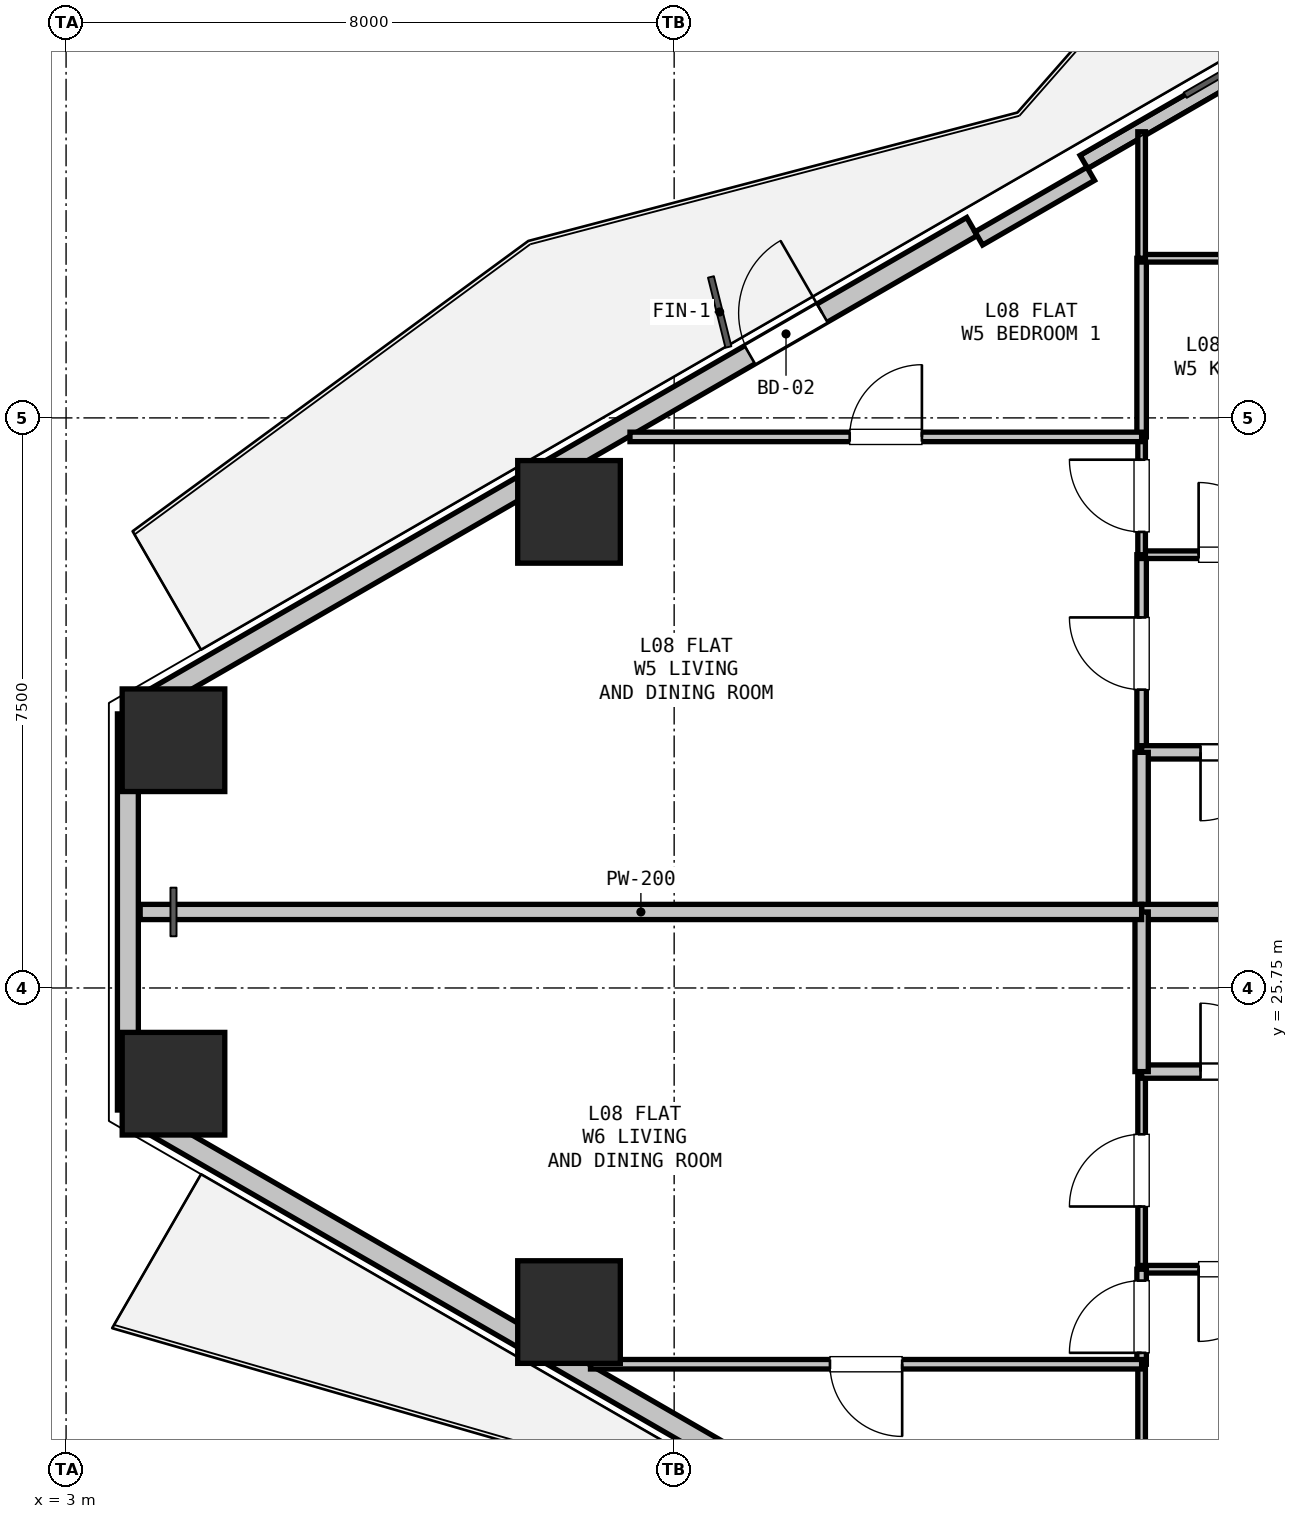
"""IFC4 building model, lengths in metres.
Left out: names, types, materials, properties, quantities, classifications, styles, units other than length and angle.
Written with IfcOpenShell. Run it as: python <this file> out.ifc"""

import sys

from ifc_helpers import new_model, si_unit, direction, frame, frame_2d, origin, origin_2d, place, context, subcontext, project, spatial, rectangle, hollow_rectangle, extrude, element, fill, save


model = new_model("IFC4")
c1 = context("Model", 3, precision=1e-05, world=origin(), true_north=direction((0.0, 1.0)))
c2 = subcontext(c1, "Body", "Model", "MODEL_VIEW")
j1 = project(units=[si_unit("LENGTHUNIT", "METRE"), si_unit("PLANEANGLEUNIT", "RADIAN")], contexts=[c1])
p1 = place(None, origin())
s1 = spatial("IfcSite", under=j1, at=p1, CompositionType="ELEMENT")
p2 = place(p1, origin())
s2 = spatial("IfcBuilding", under=s1, at=p2, CompositionType="ELEMENT")
p3 = place(p2, frame((0.0, 0.0, 32.4)))
s3 = spatial("IfcBuildingStorey", under=s2, at=p3, CompositionType="ELEMENT", Elevation=32.4)
for number, where, z_axis, x_axis in (
    (1, (4.413, 29.009, 0.0), (0.0, 0.0, 1.0), (1.0, 0.0, 0.0)),
    (2, (9.617, 32.014, 0.0), (0.0, 0.0, 1.0), (1.0, 0.0, 0.0)),
    (3, (9.617, 21.486, 0.0), (0.0, 0.0, 1.0), (1.0, 0.0, 0.0)),
    (4, (4.413, 24.491, 0.0), (0.0, 0.0, 1.0), (1.0, 0.0, 0.0)),
):
    element("IfcColumn", number, at=place(p3, frame(where, z_axis=z_axis, x_axis=x_axis)), inside=s3, PredefinedType="COLUMN", context=c2, shape_type="SweptSolid", body=[
        extrude(hollow_rectangle(XDim=1.35, YDim=1.35, WallThickness=0.036, at=origin_2d()), origin(), (0.0, 0.0, 1.0), 3.3),
    ])
p4 = place(p3, frame((3.813, 24.144, 0.0), z_axis=(0.0, 0.0, 1.0), x_axis=(0.0, 1.0, 0.0)))
e5 = element("IfcWall", 5, at=p4, inside=s3, PredefinedType="SOLIDWALL", context=c2, shape_type="SweptSolid", body=[
    extrude(rectangle(XDim=5.211, YDim=0.275, at=frame_2d((2.606, 0.0))), origin(), (0.0, 0.0, 1.0), 2.66),
])
p5 = place(p3, frame((3.943, 29.431, 0.0), z_axis=(0.0, 0.0, 1.0), x_axis=(0.866027105532, 0.499997052475, 0.0)))
e6 = element("IfcWall", 6, at=p5, inside=s3, PredefinedType="SOLIDWALL", context=c2, shape_type="SweptSolid", body=[
    extrude(rectangle(XDim=12.673, YDim=0.275, at=frame_2d((6.336, 0.0))), origin(), (0.0, 0.0, 1.0), 2.66),
])
p6 = place(p5, frame((9.298, 0.0, 0.0)))
e7 = element("IfcOpeningElement", 7, at=p6, cuts=e6, PredefinedType="OPENING", context=c2, shape_type="SweptSolid", body=[
    extrude(rectangle(XDim=1.1, YDim=2.1, at=frame_2d((0.55, 1.05))), frame((0.0, 0.147, 0.0), z_axis=(0.0, -1.0, 0.0), x_axis=(1.0, 0.0, 0.0)), (0.0, 0.0, 1.0), 0.295),
])
p7 = place(p3, frame((16.39, 36.617, 0.0), z_axis=(0.0, 0.0, 1.0), x_axis=(0.866027351828, 0.499996625875, 0.0)))
e8 = element("IfcWall", 8, at=p7, inside=s3, PredefinedType="PARAPET", context=c2, shape_type="SweptSolid", body=[
    extrude(rectangle(XDim=11.973, YDim=0.2, at=frame_2d((5.987, 0.0))), origin(), (0.0, 0.0, 1.0), 0.2),
])
p8 = place(p3, frame((15.008, 35.611, 0.0), z_axis=(0.0, 0.0, 1.0), x_axis=(0.86605165483, 0.499954529098, 0.0)))
e9 = element("IfcWall", 9, at=p8, inside=s3, PredefinedType="PARAPET", context=c2, shape_type="SweptSolid", body=[
    extrude(rectangle(XDim=1.7, YDim=0.2, at=frame_2d((0.85, 0.0))), origin(), (0.0, 0.0, 1.0), 2.66),
])
p9 = place(p3, frame((14.918, 17.733, 0.0), z_axis=(0.0, 0.0, 1.0), x_axis=(-0.866027105532, 0.499997052475, 0.0)))
e10 = element("IfcWall", 10, at=p9, inside=s3, PredefinedType="SOLIDWALL", context=c2, shape_type="SweptSolid", body=[
    extrude(rectangle(XDim=12.673, YDim=0.275, at=frame_2d((6.336, 0.0))), origin(), (0.0, 0.0, 1.0), 2.66),
])
p10 = place(p9, frame((2.216, 0.0, 0.9)))
e11 = element("IfcOpeningElement", 11, at=p10, cuts=e10, PredefinedType="OPENING", context=c2, shape_type="SweptSolid", body=[
    extrude(rectangle(XDim=1.2, YDim=1.4, at=frame_2d((0.6, 0.7))), frame((0.0, 0.147, 0.0), z_axis=(0.0, -1.0, 0.0), x_axis=(1.0, 0.0, 0.0)), (0.0, 0.0, 1.0), 0.295),
])
p11 = place(p3, frame((17.15, 28.85, 0.0), z_axis=(0.0, 0.0, 1.0), x_axis=(0.0, 1.0, 0.0)))
e12 = element("IfcWall", 12, at=p11, inside=s3, PredefinedType="PARTITIONING", context=c2, shape_type="SweptSolid", body=[
    extrude(rectangle(XDim=2.6, YDim=0.125, at=frame_2d((1.3, 0.0))), origin(), (0.0, 0.0, 1.0), 3.04),
])
p12 = place(p11, frame((0.825, 0.0, 0.0)))
e13 = element("IfcOpeningElement", 13, at=p12, cuts=e12, PredefinedType="OPENING", context=c2, shape_type="SweptSolid", body=[
    extrude(rectangle(XDim=0.95, YDim=2.1, at=frame_2d((0.475, 1.05))), frame((0.0, 0.073, 0.0), z_axis=(0.0, -1.0, 0.0), x_axis=(1.0, 0.0, 0.0)), (0.0, 0.0, 1.0), 0.145),
])
p13 = place(p3, frame((17.15, 31.45, 0.0), z_axis=(0.0, 0.0, 1.0), x_axis=(1.0, 0.0, 0.0)))
e14 = element("IfcWall", 14, at=p13, inside=s3, PredefinedType="PARTITIONING", context=c2, shape_type="SweptSolid", body=[
    extrude(rectangle(XDim=2.45, YDim=0.1, at=frame_2d((1.225, 0.0))), origin(), (0.0, 0.0, 1.0), 3.04),
])
p14 = place(p13, frame((0.75, 0.0, 0.0)))
e15 = element("IfcOpeningElement", 15, at=p14, cuts=e14, PredefinedType="OPENING", context=c2, shape_type="SweptSolid", body=[
    extrude(rectangle(XDim=0.95, YDim=2.1, at=frame_2d((0.475, 1.05))), frame((0.0, 0.06, 0.0), z_axis=(0.0, -1.0, 0.0), x_axis=(1.0, 0.0, 0.0)), (0.0, 0.0, 1.0), 0.12),
])
p15 = place(p3, frame((19.6, 28.85, 0.0), z_axis=(0.0, 0.0, 1.0), x_axis=(-1.0, 0.0, 0.0)))
e16 = element("IfcWall", 16, at=p15, inside=s3, PredefinedType="PLUMBINGWALL", context=c2, shape_type="SweptSolid", body=[
    extrude(rectangle(XDim=2.45, YDim=0.175, at=frame_2d((1.225, 0.0))), origin(), (0.0, 0.0, 1.0), 3.04),
])
p16 = place(p15, frame((0.775, 0.0, 0.0)))
e17 = element("IfcOpeningElement", 17, at=p16, cuts=e16, PredefinedType="OPENING", context=c2, shape_type="SweptSolid", body=[
    extrude(rectangle(XDim=0.9, YDim=2.1, at=frame_2d((0.45, 1.05))), frame((0.0, 0.097, 0.0), z_axis=(0.0, -1.0, 0.0), x_axis=(1.0, 0.0, 0.0)), (0.0, 0.0, 1.0), 0.195),
])
p17 = place(p3, frame((17.15, 22.05, 0.0), z_axis=(0.0, 0.0, 1.0), x_axis=(0.0, 1.0, 0.0)))
e18 = element("IfcWall", 18, at=p17, inside=s3, PredefinedType="PARTITIONING", context=c2, shape_type="SweptSolid", body=[
    extrude(rectangle(XDim=2.6, YDim=0.1, at=frame_2d((1.3, 0.0))), origin(), (0.0, 0.0, 1.0), 3.04),
])
p18 = place(p17, frame((0.825, 0.0, 0.0)))
e19 = element("IfcOpeningElement", 19, at=p18, cuts=e18, PredefinedType="OPENING", context=c2, shape_type="SweptSolid", body=[
    extrude(rectangle(XDim=0.95, YDim=2.1, at=frame_2d((0.475, 1.05))), frame((0.0, 0.06, 0.0), z_axis=(0.0, -1.0, 0.0), x_axis=(1.0, 0.0, 0.0)), (0.0, 0.0, 1.0), 0.12),
])
p19 = place(p3, frame((17.15, 24.65, 0.0), z_axis=(0.0, 0.0, 1.0), x_axis=(1.0, 0.0, 0.0)))
e20 = element("IfcWall", 20, at=p19, inside=s3, PredefinedType="PLUMBINGWALL", context=c2, shape_type="SweptSolid", body=[
    extrude(rectangle(XDim=2.45, YDim=0.175, at=frame_2d((1.225, 0.0))), origin(), (0.0, 0.0, 1.0), 3.04),
])
p20 = place(p19, frame((0.775, 0.0, 0.0)))
e21 = element("IfcOpeningElement", 21, at=p20, cuts=e20, PredefinedType="OPENING", context=c2, shape_type="SweptSolid", body=[
    extrude(rectangle(XDim=0.9, YDim=2.1, at=frame_2d((0.45, 1.05))), frame((0.0, 0.097, 0.0), z_axis=(0.0, -1.0, 0.0), x_axis=(1.0, 0.0, 0.0)), (0.0, 0.0, 1.0), 0.195),
])
p21 = place(p3, frame((19.6, 22.05, 0.0), z_axis=(0.0, 0.0, 1.0), x_axis=(-1.0, 0.0, 0.0)))
e22 = element("IfcWall", 22, at=p21, inside=s3, PredefinedType="PARTITIONING", context=c2, shape_type="SweptSolid", body=[
    extrude(rectangle(XDim=2.45, YDim=0.1, at=frame_2d((1.225, 0.0))), origin(), (0.0, 0.0, 1.0), 3.04),
])
p22 = place(p21, frame((0.75, 0.0, 0.0)))
e23 = element("IfcOpeningElement", 23, at=p22, cuts=e22, PredefinedType="OPENING", context=c2, shape_type="SweptSolid", body=[
    extrude(rectangle(XDim=0.95, YDim=2.1, at=frame_2d((0.475, 1.05))), frame((0.0, 0.06, 0.0), z_axis=(0.0, -1.0, 0.0), x_axis=(1.0, 0.0, 0.0)), (0.0, 0.0, 1.0), 0.12),
])
p23 = place(p3, frame((17.15, 26.75, 0.0), z_axis=(0.0, 0.0, 1.0), x_axis=(0.0, 1.0, 0.0)))
e24 = element("IfcWall", 24, at=p23, inside=s3, PredefinedType="PLUMBINGWALL", context=c2, shape_type="SweptSolid", body=[
    extrude(rectangle(XDim=2.1, YDim=0.175, at=frame_2d((1.05, 0.0))), origin(), (0.0, 0.0, 1.0), 3.04),
])
p24 = place(p3, frame((19.6, 26.75, 0.0), z_axis=(0.0, 0.0, 1.0), x_axis=(-1.0, 0.0, 0.0)))
e25 = element("IfcWall", 25, at=p24, inside=s3, PredefinedType="PARTITIONING", context=c2, shape_type="SweptSolid", body=[
    extrude(rectangle(XDim=2.45, YDim=0.2, at=frame_2d((1.225, 0.0))), origin(), (0.0, 0.0, 1.0), 3.04),
])
p25 = place(p3, frame((17.15, 31.45, 0.0), z_axis=(0.0, 0.0, 1.0), x_axis=(0.0, 1.0, 0.0)))
e26 = element("IfcWall", 26, at=p25, inside=s3, PredefinedType="PARTITIONING", context=c2, shape_type="SweptSolid", body=[
    extrude(rectangle(XDim=1.55, YDim=0.1, at=frame_2d((0.775, 0.0))), origin(), (0.0, 0.0, 1.0), 2.338),
])
p26 = place(p25, frame((0.3, 0.0, 0.0)))
e27 = element("IfcOpeningElement", 27, at=p26, cuts=e26, PredefinedType="OPENING", context=c2, shape_type="SweptSolid", body=[
    extrude(rectangle(XDim=0.95, YDim=2.1, at=frame_2d((0.475, 1.05))), frame((0.0, 0.06, 0.0), z_axis=(0.0, -1.0, 0.0), x_axis=(1.0, 0.0, 0.0)), (0.0, 0.0, 1.0), 0.12),
])
p27 = place(p3, frame((17.15, 33.0, 0.0), z_axis=(0.0, 0.0, 1.0), x_axis=(0.0, 1.0, 0.0)))
e28 = element("IfcWall", 28, at=p27, inside=s3, PredefinedType="PARTITIONING", context=c2, shape_type="SweptSolid", body=[
    extrude(rectangle(XDim=2.35, YDim=0.125, at=frame_2d((1.175, 0.0))), origin(), (0.0, 0.0, 1.0), 3.04),
])
p28 = place(p3, frame((17.15, 35.35, 0.0), z_axis=(0.0, 0.0, 1.0), x_axis=(1.0, 0.0, 0.0)))
e29 = element("IfcWall", 29, at=p28, inside=s3, PredefinedType="PARTITIONING", context=c2, shape_type="SweptSolid", body=[
    extrude(rectangle(XDim=2.45, YDim=0.1, at=frame_2d((1.225, 0.0))), origin(), (0.0, 0.0, 1.0), 3.04),
])
p29 = place(p3, frame((17.15, 24.65, 0.0), z_axis=(0.0, 0.0, 1.0), x_axis=(0.0, 1.0, 0.0)))
e30 = element("IfcWall", 30, at=p29, inside=s3, PredefinedType="PLUMBINGWALL", context=c2, shape_type="SweptSolid", body=[
    extrude(rectangle(XDim=2.1, YDim=0.175, at=frame_2d((1.05, 0.0))), origin(), (0.0, 0.0, 1.0), 3.04),
])
p30 = place(p3, frame((17.15, 18.15, 0.0), z_axis=(0.0, 0.0, 1.0), x_axis=(0.0, 1.0, 0.0)))
e31 = element("IfcWall", 31, at=p30, inside=s3, PredefinedType="PARTITIONING", context=c2, shape_type="SweptSolid", body=[
    extrude(rectangle(XDim=2.65, YDim=0.1, at=frame_2d((1.325, 0.0))), origin(), (0.0, 0.0, 1.0), 3.04),
])
p31 = place(p3, frame((17.15, 20.8, 0.0), z_axis=(0.0, 0.0, 1.0), x_axis=(0.0, 1.0, 0.0)))
e32 = element("IfcWall", 32, at=p31, inside=s3, PredefinedType="PARTITIONING", context=c2, shape_type="SweptSolid", body=[
    extrude(rectangle(XDim=1.25, YDim=0.125, at=frame_2d((0.625, 0.0))), origin(), (0.0, 0.0, 1.0), 2.338),
])
p32 = place(p31, frame((0.15, 0.0, 0.0)))
e33 = element("IfcOpeningElement", 33, at=p32, cuts=e32, PredefinedType="OPENING", context=c2, shape_type="SweptSolid", body=[
    extrude(rectangle(XDim=0.95, YDim=2.1, at=frame_2d((0.475, 1.05))), frame((0.0, 0.073, 0.0), z_axis=(0.0, -1.0, 0.0), x_axis=(1.0, 0.0, 0.0)), (0.0, 0.0, 1.0), 0.145),
])
p33 = place(p3, frame((10.419, 33.0, 0.0), z_axis=(0.0, 0.0, 1.0), x_axis=(1.0, 0.0, 0.0)))
e34 = element("IfcWall", 34, at=p33, inside=s3, PredefinedType="PARTITIONING", context=c2, shape_type="SweptSolid", body=[
    extrude(rectangle(XDim=6.731, YDim=0.125, at=frame_2d((3.365, 0.0))), origin(), (0.0, 0.0, 1.0), 2.365),
])
p34 = place(p33, frame((2.89, 0.0, 0.0)))
e35 = element("IfcOpeningElement", 35, at=p34, cuts=e34, PredefinedType="OPENING", context=c2, shape_type="SweptSolid", body=[
    extrude(rectangle(XDim=0.95, YDim=2.1, at=frame_2d((0.475, 1.05))), frame((0.0, 0.073, 0.0), z_axis=(0.0, -1.0, 0.0), x_axis=(1.0, 0.0, 0.0)), (0.0, 0.0, 1.0), 0.145),
])
p35 = place(p3, frame((17.15, 26.75, 0.0), z_axis=(0.0, 0.0, 1.0), x_axis=(-1.0, 0.0, 0.0)))
e36 = element("IfcWall", 36, at=p35, inside=s3, PredefinedType="PARTITIONING", context=c2, shape_type="SweptSolid", body=[
    extrude(rectangle(XDim=13.175, YDim=0.2, at=frame_2d((6.588, 0.0))), origin(), (0.0, 0.0, 1.0), 2.65),
])
p36 = place(p3, frame((3.813, 29.356, 0.0), z_axis=(0.0, 0.0, 1.0), x_axis=(0.866131372301, 0.499816412211, 0.0)))
e37 = element("IfcWall", 37, at=p36, inside=s3, PredefinedType="PARTITIONING", context=c2, shape_type="SweptSolid", body=[
    extrude(rectangle(XDim=0.15, YDim=0.125, at=frame_2d((0.075, 0.0))), origin(), (0.0, 0.0, 1.0), 3.04),
])
p37 = place(p3, frame((17.15, 37.014, 0.0), z_axis=(0.0, 0.0, 1.0), x_axis=(0.0, -1.0, 0.0)))
e38 = element("IfcWall", 38, at=p37, inside=s3, PredefinedType="PARTITIONING", context=c2, shape_type="SweptSolid", body=[
    extrude(rectangle(XDim=1.664, YDim=0.1, at=frame_2d((0.832, 0.0))), origin(), (0.0, 0.0, 1.0), 2.365),
])
p38 = place(p3, frame((17.15, 20.8, 0.0), z_axis=(0.0, 0.0, 1.0), x_axis=(-1.0, 0.0, 0.0)))
e39 = element("IfcWall", 39, at=p38, inside=s3, PredefinedType="PARTITIONING", context=c2, shape_type="SweptSolid", body=[
    extrude(rectangle(XDim=7.25, YDim=0.125, at=frame_2d((3.625, 0.0))), origin(), (0.0, 0.0, 1.0), 2.365),
])
p39 = place(p38, frame((3.15, 0.0, 0.0)))
e40 = element("IfcOpeningElement", 40, at=p39, cuts=e39, PredefinedType="OPENING", context=c2, shape_type="SweptSolid", body=[
    extrude(rectangle(XDim=0.95, YDim=2.1, at=frame_2d((0.475, 1.05))), frame((0.0, 0.073, 0.0), z_axis=(0.0, -1.0, 0.0), x_axis=(1.0, 0.0, 0.0)), (0.0, 0.0, 1.0), 0.145),
])
p40 = place(p3, frame((3.943, 24.069, 0.0), z_axis=(0.0, 0.0, 1.0), x_axis=(-0.866131372301, 0.499816412211, 0.0)))
e41 = element("IfcWall", 41, at=p40, inside=s3, PredefinedType="PARTITIONING", context=c2, shape_type="SweptSolid", body=[
    extrude(rectangle(XDim=0.15, YDim=0.1, at=frame_2d((0.075, 0.0))), origin(), (0.0, 0.0, 1.0), 3.04),
])
p41 = place(p6, origin())
e42 = element("IfcDoor", 42, at=p41, inside=s3, OperationType="SINGLE_SWING_RIGHT", PredefinedType="DOOR", context=c2, shape_type="SweptSolid", body=[
    extrude(rectangle(XDim=1.1, YDim=2.1, at=frame_2d((0.55, 1.05))), frame((0.0, 0.025, 0.0), z_axis=(0.0, -1.0, 0.0), x_axis=(1.0, 0.0, 0.0)), (0.0, 0.0, 1.0), 0.05),
])
fill(e7, e42)
p42 = place(p16, origin())
e43 = element("IfcDoor", 43, at=p42, inside=s3, OperationType="SINGLE_SWING_RIGHT", PredefinedType="DOOR", context=c2, shape_type="SweptSolid", body=[
    extrude(rectangle(XDim=0.9, YDim=2.1, at=frame_2d((0.45, 1.05))), frame((0.0, 0.025, 0.0), z_axis=(0.0, -1.0, 0.0), x_axis=(1.0, 0.0, 0.0)), (0.0, 0.0, 1.0), 0.05),
])
fill(e17, e43)
p43 = place(p14, origin())
e44 = element("IfcDoor", 44, at=p43, inside=s3, OperationType="SINGLE_SWING_LEFT", PredefinedType="DOOR", context=c2, shape_type="SweptSolid", body=[
    extrude(rectangle(XDim=0.95, YDim=2.1, at=frame_2d((0.475, 1.05))), frame((0.0, 0.025, 0.0), z_axis=(0.0, -1.0, 0.0), x_axis=(1.0, 0.0, 0.0)), (0.0, 0.0, 1.0), 0.05),
])
fill(e15, e44)
p44 = place(p12, origin())
e45 = element("IfcDoor", 45, at=p44, inside=s3, OperationType="SINGLE_SWING_RIGHT", PredefinedType="DOOR", context=c2, shape_type="SweptSolid", body=[
    extrude(rectangle(XDim=0.95, YDim=2.1, at=frame_2d((0.475, 1.05))), frame((0.0, 0.025, 0.0), z_axis=(0.0, -1.0, 0.0), x_axis=(1.0, 0.0, 0.0)), (0.0, 0.0, 1.0), 0.05),
])
fill(e13, e45)
p45 = place(p20, origin())
e46 = element("IfcDoor", 46, at=p45, inside=s3, OperationType="SINGLE_SWING_LEFT", PredefinedType="DOOR", context=c2, shape_type="SweptSolid", body=[
    extrude(rectangle(XDim=0.9, YDim=2.1, at=frame_2d((0.45, 1.05))), frame((0.0, 0.025, 0.0), z_axis=(0.0, -1.0, 0.0), x_axis=(1.0, 0.0, 0.0)), (0.0, 0.0, 1.0), 0.05),
])
fill(e21, e46)
p46 = place(p22, origin())
e47 = element("IfcDoor", 47, at=p46, inside=s3, OperationType="SINGLE_SWING_RIGHT", PredefinedType="DOOR", context=c2, shape_type="SweptSolid", body=[
    extrude(rectangle(XDim=0.95, YDim=2.1, at=frame_2d((0.475, 1.05))), frame((0.0, 0.025, 0.0), z_axis=(0.0, -1.0, 0.0), x_axis=(1.0, 0.0, 0.0)), (0.0, 0.0, 1.0), 0.05),
])
fill(e23, e47)
p47 = place(p18, origin())
e48 = element("IfcDoor", 48, at=p47, inside=s3, OperationType="SINGLE_SWING_LEFT", PredefinedType="DOOR", context=c2, shape_type="SweptSolid", body=[
    extrude(rectangle(XDim=0.95, YDim=2.1, at=frame_2d((0.475, 1.05))), frame((0.0, 0.025, 0.0), z_axis=(0.0, -1.0, 0.0), x_axis=(1.0, 0.0, 0.0)), (0.0, 0.0, 1.0), 0.05),
])
fill(e19, e48)
p48 = place(p26, origin())
e49 = element("IfcDoor", 49, at=p48, inside=s3, OperationType="SINGLE_SWING_RIGHT", PredefinedType="DOOR", context=c2, shape_type="SweptSolid", body=[
    extrude(rectangle(XDim=0.95, YDim=2.1, at=frame_2d((0.475, 1.05))), frame((0.0, 0.025, 0.0), z_axis=(0.0, -1.0, 0.0), x_axis=(1.0, 0.0, 0.0)), (0.0, 0.0, 1.0), 0.05),
])
fill(e27, e49)
p49 = place(p32, origin())
e50 = element("IfcDoor", 50, at=p49, inside=s3, OperationType="SINGLE_SWING_LEFT", PredefinedType="DOOR", context=c2, shape_type="SweptSolid", body=[
    extrude(rectangle(XDim=0.95, YDim=2.1, at=frame_2d((0.475, 1.05))), frame((0.0, 0.025, 0.0), z_axis=(0.0, -1.0, 0.0), x_axis=(1.0, 0.0, 0.0)), (0.0, 0.0, 1.0), 0.05),
])
fill(e33, e50)
p50 = place(p34, origin())
e51 = element("IfcDoor", 51, at=p50, inside=s3, OperationType="SINGLE_SWING_RIGHT", PredefinedType="DOOR", context=c2, shape_type="SweptSolid", body=[
    extrude(rectangle(XDim=0.95, YDim=2.1, at=frame_2d((0.475, 1.05))), frame((0.0, 0.025, 0.0), z_axis=(0.0, -1.0, 0.0), x_axis=(1.0, 0.0, 0.0)), (0.0, 0.0, 1.0), 0.05),
])
fill(e35, e51)
p51 = place(p39, origin())
e52 = element("IfcDoor", 52, at=p51, inside=s3, OperationType="SINGLE_SWING_LEFT", PredefinedType="DOOR", context=c2, shape_type="SweptSolid", body=[
    extrude(rectangle(XDim=0.95, YDim=2.1, at=frame_2d((0.475, 1.05))), frame((0.0, 0.025, 0.0), z_axis=(0.0, -1.0, 0.0), x_axis=(1.0, 0.0, 0.0)), (0.0, 0.0, 1.0), 0.05),
])
fill(e40, e52)
save(model, sys.argv[1])
